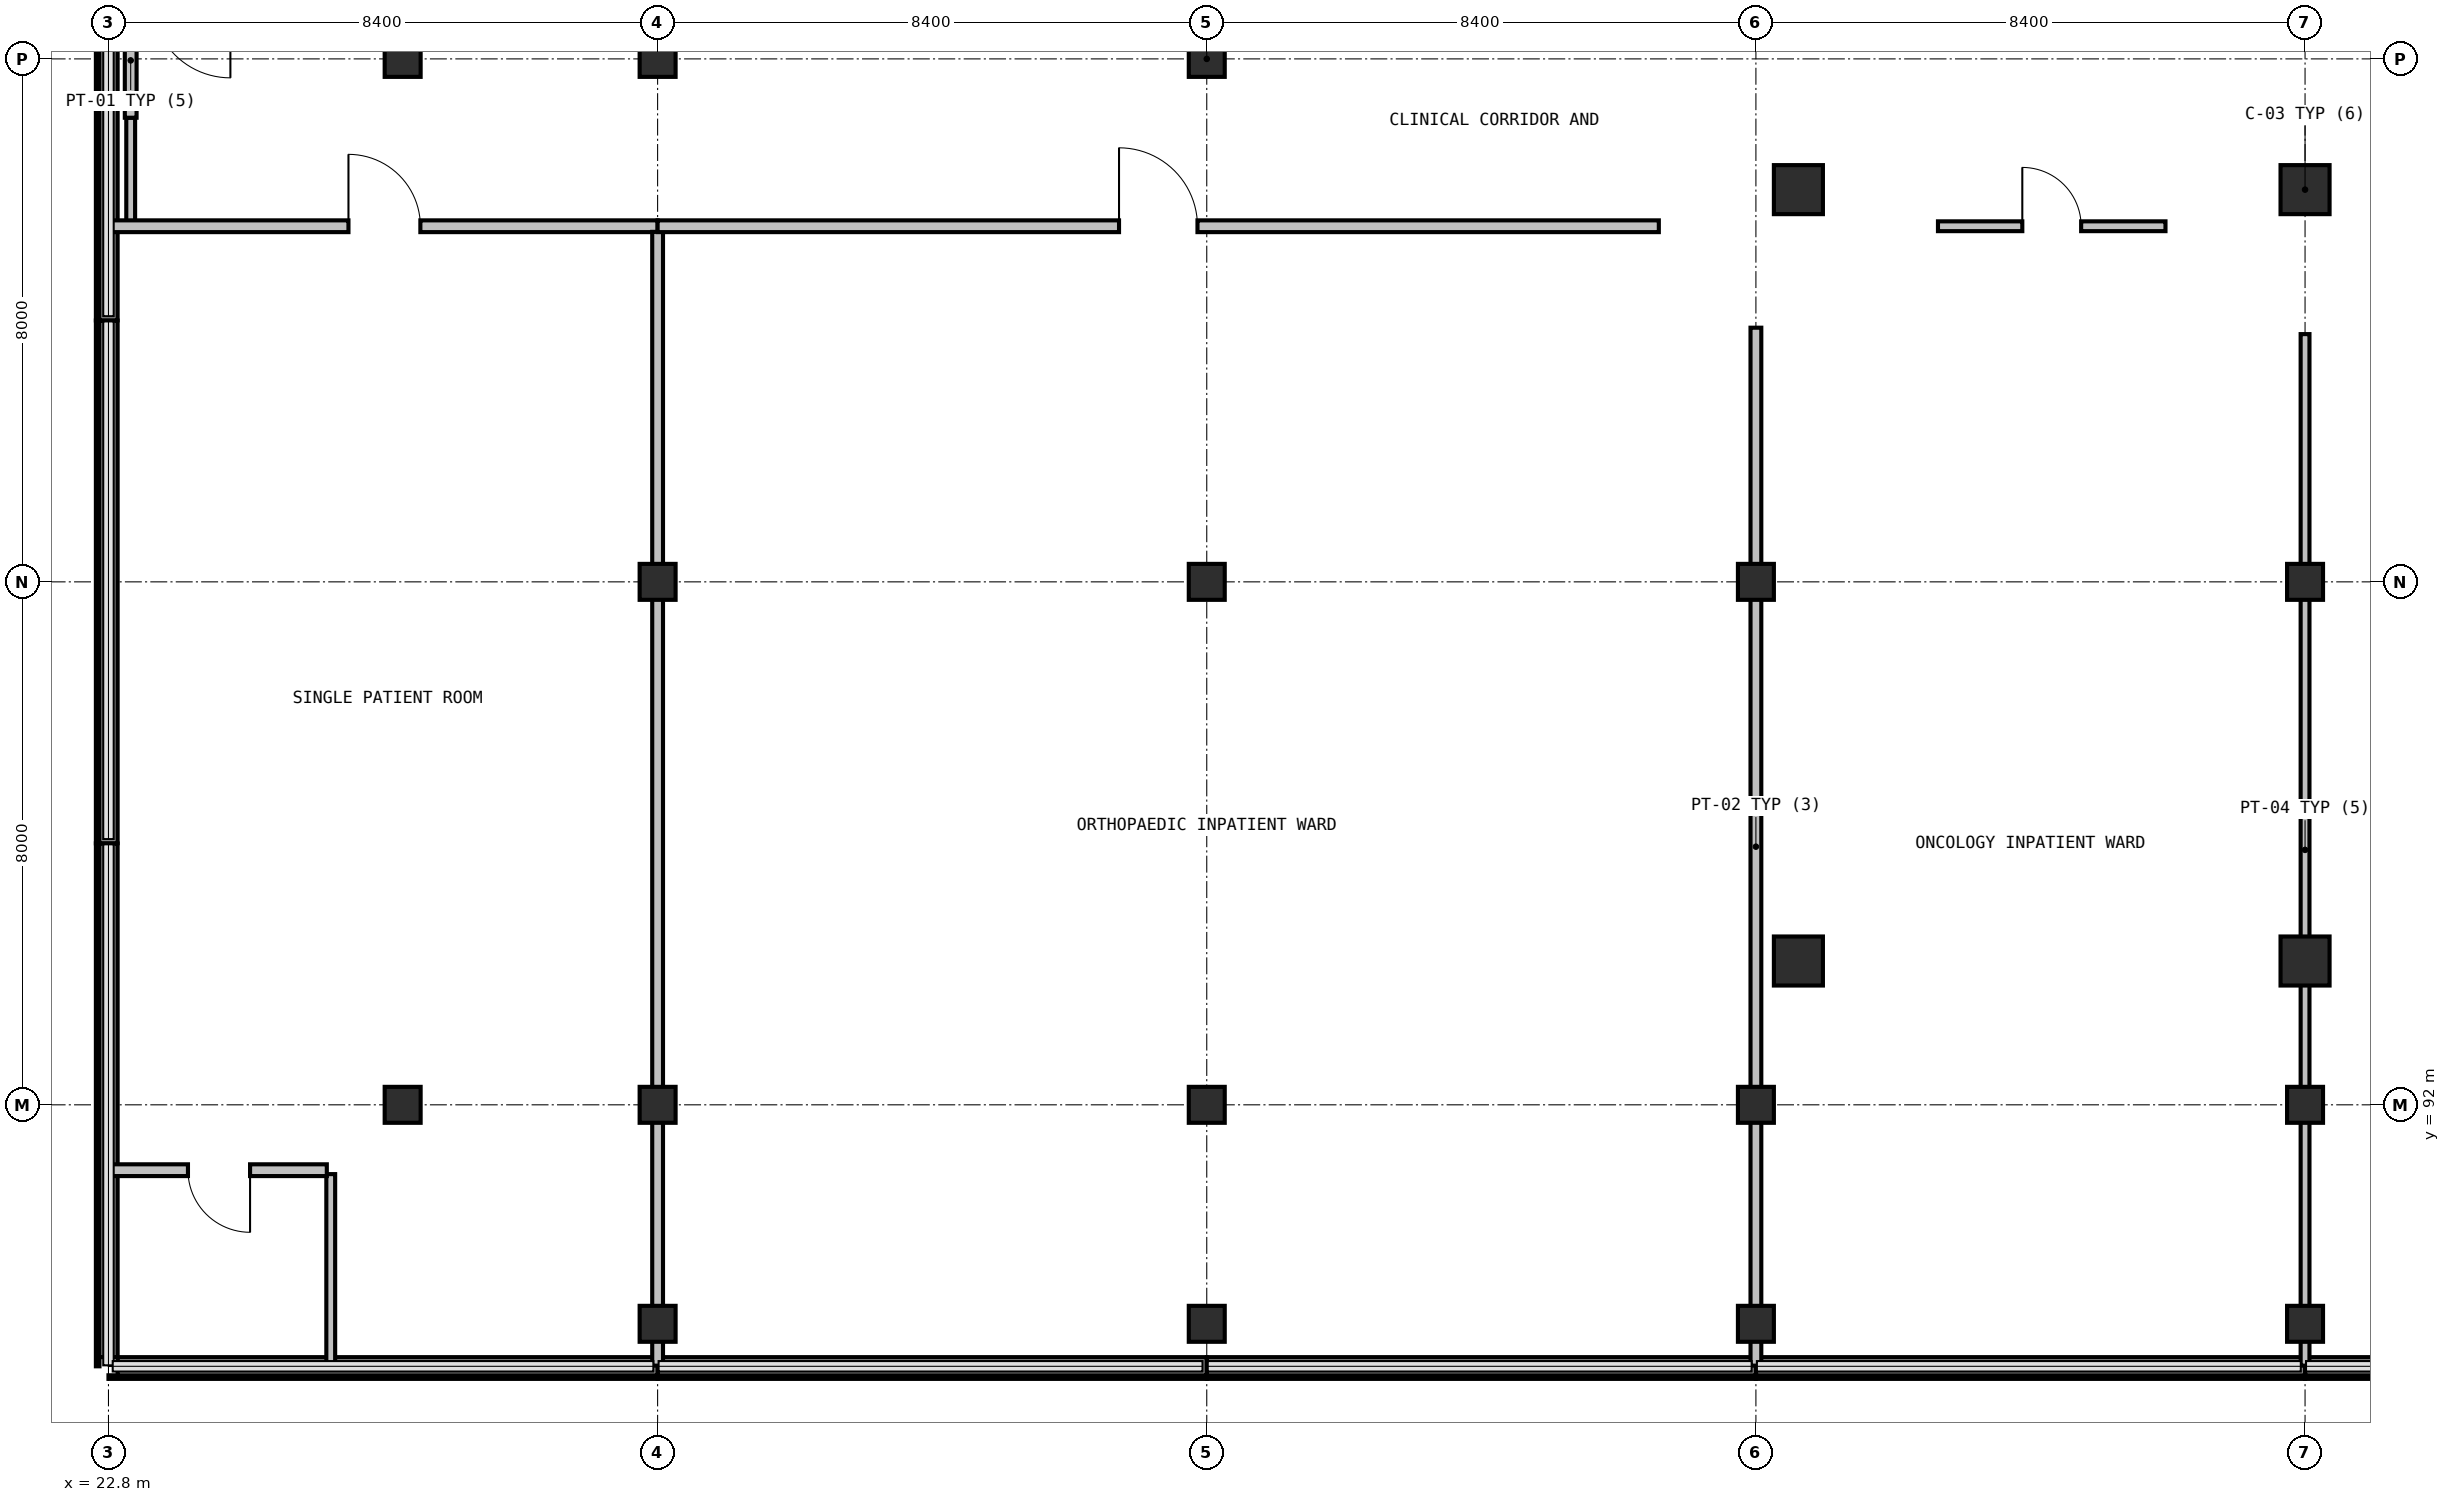
"""IFC4 building model, lengths in metres.
Left out: names, types, materials, properties, quantities, classifications, styles, units other than length and angle.
Written with IfcOpenShell. Run it as: python <this file> out.ifc"""

import sys

from ifc_helpers import new_model, si_unit, direction, frame, frame_2d, origin, origin_2d, place, context, subcontext, project, spatial, rectangle, extrude, element, fill, save


model = new_model("IFC4")
c1 = context("Model", 3, precision=1e-05, world=origin(), true_north=direction((0.0, 1.0)))
c2 = subcontext(c1, "Body", "Model", "MODEL_VIEW")
j1 = project(units=[si_unit("LENGTHUNIT", "METRE"), si_unit("PLANEANGLEUNIT", "RADIAN")], contexts=[c1])
p1 = place(None, origin())
s1 = spatial("IfcSite", under=j1, at=p1, CompositionType="ELEMENT")
p2 = place(p1, origin())
s2 = spatial("IfcBuilding", under=s1, at=p2, CompositionType="ELEMENT")
p3 = place(p2, frame((0.0, 0.0, 31.35)))
s3 = spatial("IfcBuildingStorey", under=s2, at=p3, CompositionType="ELEMENT", Elevation=31.35)
for number, where, z_axis, x_axis in (
    (1, (48.65, 94.2, 0.0), (0.0, 0.0, 1.0), (1.0, 0.0, 0.0)),
    (2, (56.4, 94.2, 0.0), (0.0, 0.0, 1.0), (1.0, 0.0, 0.0)),
    (3, (48.65, 106.0, 0.0), (0.0, 0.0, 1.0), (1.0, 0.0, 0.0)),
    (4, (56.4, 106.0, 0.0), (0.0, 0.0, 1.0), (1.0, 0.0, 0.0)),
):
    element("IfcColumn", number, at=place(p3, frame(where, z_axis=z_axis, x_axis=x_axis)), inside=s3, PredefinedType="COLUMN", context=c2, shape_type="SweptSolid", body=[
        extrude(rectangle(XDim=0.75, YDim=0.75, at=origin_2d()), origin(), (0.0, 0.0, 1.0), 4.05),
    ])
for number, where, z_axis, x_axis in (
    (5, (27.3, 92.0, 0.0), (0.0, 0.0, 1.0), (1.0, 0.0, 0.0)),
    (6, (27.3, 108.0, 0.0), (0.0, 0.0, 1.0), (1.0, 0.0, 0.0)),
):
    element("IfcColumn", number, at=place(p3, frame(where, z_axis=z_axis, x_axis=x_axis)), inside=s3, PredefinedType="COLUMN", context=c2, shape_type="SweptSolid", body=[
        extrude(rectangle(XDim=0.55, YDim=0.55, at=origin_2d()), origin(), (0.0, 0.0, 1.0), 3.778),
    ])
for number, where, z_axis, x_axis in (
    (7, (31.2, 88.65, 0.0), (0.0, 0.0, 1.0), (1.0, 0.0, 0.0)),
    (8, (31.2, 92.0, 0.0), (0.0, 0.0, 1.0), (1.0, 0.0, 0.0)),
    (9, (31.2, 100.0, 0.0), (0.0, 0.0, 1.0), (1.0, 0.0, 0.0)),
    (10, (31.2, 108.0, 0.0), (0.0, 0.0, 1.0), (1.0, 0.0, 0.0)),
):
    element("IfcColumn", number, at=place(p3, frame(where, z_axis=z_axis, x_axis=x_axis)), inside=s3, PredefinedType="COLUMN", context=c2, shape_type="SweptSolid", body=[
        extrude(rectangle(XDim=0.55, YDim=0.55, at=origin_2d()), origin(), (0.0, 0.0, 1.0), 3.785),
    ])
for number, where, z_axis, x_axis in (
    (11, (39.6, 88.65, 0.0), (0.0, 0.0, 1.0), (1.0, 0.0, 0.0)),
    (12, (39.6, 92.0, 0.0), (0.0, 0.0, 1.0), (1.0, 0.0, 0.0)),
    (13, (39.6, 100.0, 0.0), (0.0, 0.0, 1.0), (1.0, 0.0, 0.0)),
    (14, (39.6, 108.0, 0.0), (0.0, 0.0, 1.0), (1.0, 0.0, 0.0)),
    (15, (48.0, 88.65, 0.0), (0.0, 0.0, 1.0), (1.0, 0.0, 0.0)),
    (16, (48.0, 92.0, 0.0), (0.0, 0.0, 1.0), (1.0, 0.0, 0.0)),
    (17, (48.0, 100.0, 0.0), (0.0, 0.0, 1.0), (1.0, 0.0, 0.0)),
    (18, (56.4, 88.65, 0.0), (0.0, 0.0, 1.0), (1.0, 0.0, 0.0)),
    (19, (56.4, 92.0, 0.0), (0.0, 0.0, 1.0), (1.0, 0.0, 0.0)),
    (20, (56.4, 100.0, 0.0), (0.0, 0.0, 1.0), (1.0, 0.0, 0.0)),
):
    element("IfcColumn", number, at=place(p3, frame(where, z_axis=z_axis, x_axis=x_axis)), inside=s3, PredefinedType="COLUMN", context=c2, shape_type="SweptSolid", body=[
        extrude(rectangle(XDim=0.55, YDim=0.55, at=origin_2d()), origin(), (0.0, 0.0, 1.0), 4.05),
    ])
p4 = place(p3, frame((22.8, 88.14, 0.0), z_axis=(0.0, 0.0, 1.0), x_axis=(0.0, 1.0, 0.0)))
e21 = element("IfcWall", 21, at=p4, inside=s3, PredefinedType="SOLIDWALL", context=c2, shape_type="SweptSolid", body=[
    extrude(rectangle(XDim=7.858, YDim=0.28, at=frame_2d((3.929, 0.0))), origin(), (0.0, 0.0, 1.0), 0.94),
])
p5 = place(p3, frame((22.8, 96.002, 0.0), z_axis=(0.0, 0.0, 1.0), x_axis=(0.0, 1.0, 0.0)))
e22 = element("IfcWall", 22, at=p5, inside=s3, PredefinedType="SOLIDWALL", context=c2, shape_type="SweptSolid", body=[
    extrude(rectangle(XDim=7.995, YDim=0.28, at=frame_2d((3.998, 0.0))), origin(), (0.0, 0.0, 1.0), 0.94),
])
p6 = place(p3, frame((22.8, 104.001, 0.0), z_axis=(0.0, 0.0, 1.0), x_axis=(0.0, 1.0, 0.0)))
e23 = element("IfcWall", 23, at=p6, inside=s3, PredefinedType="SOLIDWALL", context=c2, shape_type="SweptSolid", body=[
    extrude(rectangle(XDim=7.996, YDim=0.28, at=frame_2d((3.998, 0.0))), origin(), (0.0, 0.0, 1.0), 0.94),
])
for number, where, z_axis, x_axis in (
    (24, (64.798, 88.0, 0.0), (0.0, 0.0, 1.0), (-1.0, 0.0, 0.0)),
    (25, (56.398, 88.0, 0.0), (0.0, 0.0, 1.0), (-1.0, 0.0, 0.0)),
    (26, (47.998, 88.0, 0.0), (0.0, 0.0, 1.0), (-1.0, 0.0, 0.0)),
    (27, (39.598, 88.0, 0.0), (0.0, 0.0, 1.0), (-1.0, 0.0, 0.0)),
):
    element("IfcWall", number, at=place(p3, frame(where, z_axis=z_axis, x_axis=x_axis)), inside=s3, PredefinedType="SOLIDWALL", context=c2, shape_type="SweptSolid", body=[
        extrude(rectangle(XDim=8.396, YDim=0.28, at=frame_2d((4.198, 0.0))), origin(), (0.0, 0.0, 1.0), 0.94),
    ])
p7 = place(p3, frame((31.198, 88.0, 0.0), z_axis=(0.0, 0.0, 1.0), x_axis=(-1.0, 0.0, 0.0)))
e28 = element("IfcWall", 28, at=p7, inside=s3, PredefinedType="SOLIDWALL", context=c2, shape_type="SweptSolid", body=[
    extrude(rectangle(XDim=8.258, YDim=0.28, at=frame_2d((4.129, 0.0))), origin(), (0.0, 0.0, 1.0), 0.94),
])
p8 = place(p3, frame((23.14, 107.1, 0.0), z_axis=(0.0, 0.0, 1.0), x_axis=(0.0, -1.0, 0.0)))
e29 = element("IfcWall", 29, at=p8, inside=s3, PredefinedType="PARTITIONING", context=c2, shape_type="SweptSolid", body=[
    extrude(rectangle(XDim=1.6, YDim=0.135, at=frame_2d((0.8, 0.0))), origin(), (0.0, 0.0, 1.0), 3.785),
])
p9 = place(p3, frame((22.842, 105.44, 0.0), z_axis=(0.0, 0.0, 1.0), x_axis=(1.0, 0.0, 0.0)))
e30 = element("IfcWall", 30, at=p9, inside=s3, PredefinedType="PARTITIONING", context=c2, shape_type="SweptSolid", body=[
    extrude(rectangle(XDim=8.358, YDim=0.18, at=frame_2d((4.179, 0.0))), origin(), (0.0, 0.0, 1.0), 3.785),
])
p10 = place(p9, frame((3.629, 0.0, 0.0)))
e31 = element("IfcOpeningElement", 31, at=p10, cuts=e30, PredefinedType="OPENING", context=c2, shape_type="SweptSolid", body=[
    extrude(rectangle(XDim=1.1, YDim=2.15, at=frame_2d((0.55, 1.075))), frame((0.0, 0.1, 0.0), z_axis=(0.0, -1.0, 0.0), x_axis=(1.0, 0.0, 0.0)), (0.0, 0.0, 1.0), 0.2),
])
p11 = place(p3, frame((31.2, 105.354, 0.0), z_axis=(0.0, 0.0, 1.0), x_axis=(0.0, -1.0, 0.0)))
e32 = element("IfcWall", 32, at=p11, inside=s3, PredefinedType="PARTITIONING", context=c2, shape_type="SweptSolid", body=[
    extrude(rectangle(XDim=17.344, YDim=0.165, at=frame_2d((8.672, 0.0))), origin(), (0.0, 0.0, 1.0), 3.785),
])
p12 = place(p3, frame((26.2, 88.042, 0.0), z_axis=(0.0, 0.0, 1.0), x_axis=(0.0, 1.0, 0.0)))
e33 = element("IfcWall", 33, at=p12, inside=s3, PredefinedType="PARTITIONING", context=c2, shape_type="SweptSolid", body=[
    extrude(rectangle(XDim=2.898, YDim=0.135, at=frame_2d((1.449, 0.0))), origin(), (0.0, 0.0, 1.0), 3.785),
])
p13 = place(p3, frame((26.14, 91.0, 0.0), z_axis=(0.0, 0.0, 1.0), x_axis=(-1.0, 0.0, 0.0)))
e34 = element("IfcWall", 34, at=p13, inside=s3, PredefinedType="PARTITIONING", context=c2, shape_type="SweptSolid", body=[
    extrude(rectangle(XDim=3.298, YDim=0.18, at=frame_2d((1.649, 0.0))), origin(), (0.0, 0.0, 1.0), 3.785),
])
p14 = place(p13, frame((1.174, 0.0, 0.0)))
e35 = element("IfcOpeningElement", 35, at=p14, cuts=e34, PredefinedType="OPENING", context=c2, shape_type="SweptSolid", body=[
    extrude(rectangle(XDim=0.95, YDim=2.1, at=frame_2d((0.475, 1.05))), frame((0.0, 0.1, 0.0), z_axis=(0.0, -1.0, 0.0), x_axis=(1.0, 0.0, 0.0)), (0.0, 0.0, 1.0), 0.2),
])
p15 = place(p3, frame((31.2, 105.44, 0.0), z_axis=(0.0, 0.0, 1.0), x_axis=(1.0, 0.0, 0.0)))
e36 = element("IfcWall", 36, at=p15, inside=s3, PredefinedType="PARTITIONING", context=c2, shape_type="SweptSolid", body=[
    extrude(rectangle(XDim=15.315, YDim=0.18, at=frame_2d((7.657, 0.0))), origin(), (0.0, 0.0, 1.0), 3.785),
])
p16 = place(p15, frame((7.058, 0.0, 0.0)))
e37 = element("IfcOpeningElement", 37, at=p16, cuts=e36, PredefinedType="OPENING", context=c2, shape_type="SweptSolid", body=[
    extrude(rectangle(XDim=1.2, YDim=2.15, at=frame_2d((0.6, 1.075))), frame((0.0, 0.1, 0.0), z_axis=(0.0, -1.0, 0.0), x_axis=(1.0, 0.0, 0.0)), (0.0, 0.0, 1.0), 0.2),
])
p17 = place(p3, frame((48.0, 103.888, 0.0), z_axis=(0.0, 0.0, 1.0), x_axis=(0.0, -1.0, 0.0)))
e38 = element("IfcWall", 38, at=p17, inside=s3, PredefinedType="PARTITIONING", context=c2, shape_type="SweptSolid", body=[
    extrude(rectangle(XDim=15.878, YDim=0.165, at=frame_2d((7.939, 0.0))), origin(), (0.0, 0.0, 1.0), 3.185),
])
p18 = place(p3, frame((50.785, 105.44, 0.0), z_axis=(0.0, 0.0, 1.0), x_axis=(1.0, 0.0, 0.0)))
e39 = element("IfcWall", 39, at=p18, inside=s3, PredefinedType="PARTITIONING", context=c2, shape_type="SweptSolid", body=[
    extrude(rectangle(XDim=3.48, YDim=0.15, at=frame_2d((1.74, 0.0))), origin(), (0.0, 0.0, 1.0), 3.785),
])
p19 = place(p18, frame((1.29, 0.0, 0.0)))
e40 = element("IfcOpeningElement", 40, at=p19, cuts=e39, PredefinedType="OPENING", context=c2, shape_type="SweptSolid", body=[
    extrude(rectangle(XDim=0.9, YDim=2.1, at=frame_2d((0.45, 1.05))), frame((0.0, 0.085, 0.0), z_axis=(0.0, -1.0, 0.0), x_axis=(1.0, 0.0, 0.0)), (0.0, 0.0, 1.0), 0.17),
])
p20 = place(p3, frame((56.4, 103.79, 0.0), z_axis=(0.0, 0.0, 1.0), x_axis=(0.0, -1.0, 0.0)))
e41 = element("IfcWall", 41, at=p20, inside=s3, PredefinedType="PARTITIONING", context=c2, shape_type="SweptSolid", body=[
    extrude(rectangle(XDim=15.78, YDim=0.135, at=frame_2d((7.89, 0.0))), origin(), (0.0, 0.0, 1.0), 3.185),
])
p21 = place(p3, frame((23.14, 108.854, 0.0), z_axis=(0.0, 0.0, 1.0), x_axis=(0.0, -1.0, 0.0)))
e42 = element("IfcWall", 42, at=p21, inside=s3, PredefinedType="PARTITIONING", context=c2, shape_type="SweptSolid", body=[
    extrude(rectangle(XDim=1.754, YDim=0.18, at=frame_2d((0.877, 0.0))), origin(), (0.0, 0.0, 1.0), 3.785),
])
p22 = place(p10, origin())
e43 = element("IfcDoor", 43, at=p22, inside=s3, OperationType="SINGLE_SWING_RIGHT", PredefinedType="DOOR", context=c2, shape_type="SweptSolid", body=[
    extrude(rectangle(XDim=1.1, YDim=2.15, at=frame_2d((0.55, 1.075))), frame((0.0, 0.025, 0.0), z_axis=(0.0, -1.0, 0.0), x_axis=(1.0, 0.0, 0.0)), (0.0, 0.0, 1.0), 0.05),
])
fill(e31, e43)
p23 = place(p14, origin())
e44 = element("IfcDoor", 44, at=p23, inside=s3, OperationType="SINGLE_SWING_LEFT", PredefinedType="DOOR", context=c2, shape_type="SweptSolid", body=[
    extrude(rectangle(XDim=0.95, YDim=2.1, at=frame_2d((0.475, 1.05))), frame((0.0, 0.025, 0.0), z_axis=(0.0, -1.0, 0.0), x_axis=(1.0, 0.0, 0.0)), (0.0, 0.0, 1.0), 0.05),
])
fill(e35, e44)
p24 = place(p16, origin())
e45 = element("IfcDoor", 45, at=p24, inside=s3, OperationType="SINGLE_SWING_RIGHT", PredefinedType="DOOR", context=c2, shape_type="SweptSolid", body=[
    extrude(rectangle(XDim=1.2, YDim=2.15, at=frame_2d((0.6, 1.075))), frame((0.0, 0.025, 0.0), z_axis=(0.0, -1.0, 0.0), x_axis=(1.0, 0.0, 0.0)), (0.0, 0.0, 1.0), 0.05),
])
fill(e37, e45)
p25 = place(p19, origin())
e46 = element("IfcDoor", 46, at=p25, inside=s3, OperationType="SINGLE_SWING_LEFT", PredefinedType="DOOR", context=c2, shape_type="SweptSolid", body=[
    extrude(rectangle(XDim=0.9, YDim=2.1, at=frame_2d((0.45, 1.05))), frame((0.0, 0.025, 0.0), z_axis=(0.0, -1.0, 0.0), x_axis=(1.0, 0.0, 0.0)), (0.0, 0.0, 1.0), 0.05),
])
fill(e40, e46)
save(model, sys.argv[1])
